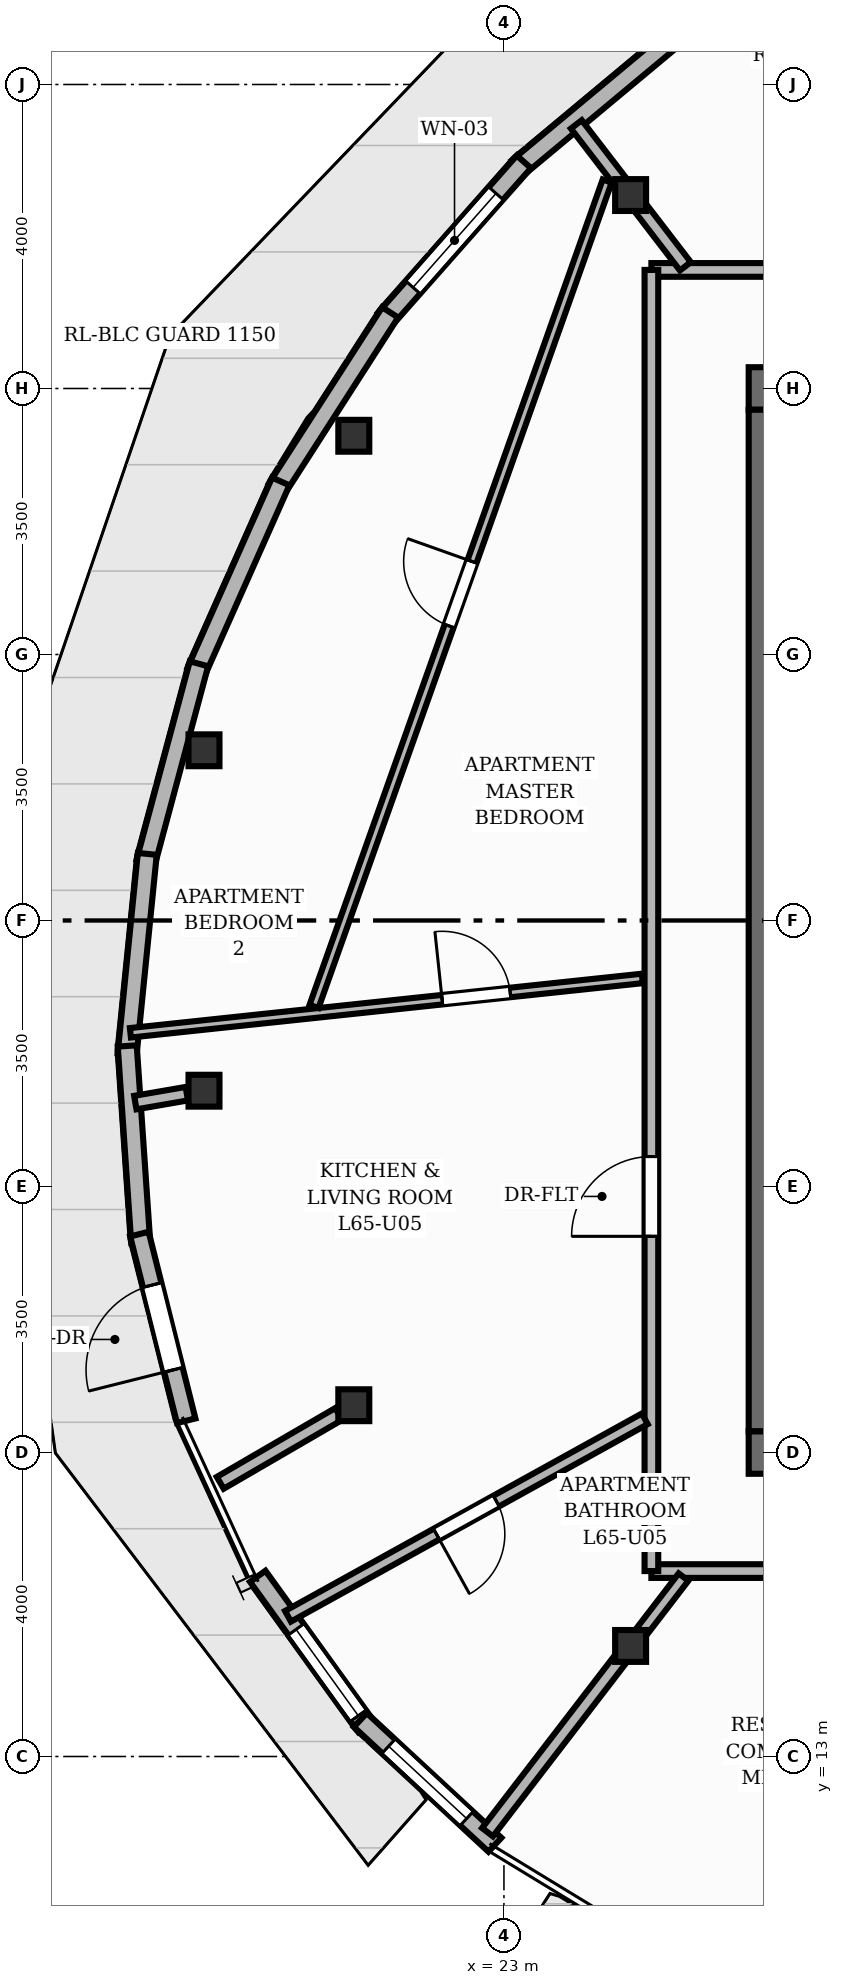
"""IFC4 building model, lengths in metres.
Left out: names, types, materials, properties, quantities, classifications, styles, units other than length and angle.
Written with IfcOpenShell. Run it as: python <this file> out.ifc"""

import sys

from ifc_helpers import new_model, si_unit, direction, frame, frame_2d, origin, origin_2d, place, context, subcontext, project, spatial, rectangle, i_section, extrude, element, fill, save


model = new_model("IFC4")
c1 = context("Model", 3, precision=1e-05, world=origin(), true_north=direction((0.0, 1.0)))
c2 = subcontext(c1, "Body", "Model", "MODEL_VIEW")
j1 = project(units=[si_unit("LENGTHUNIT", "METRE"), si_unit("PLANEANGLEUNIT", "RADIAN")], contexts=[c1])
p1 = place(None, origin())
s1 = spatial("IfcSite", under=j1, at=p1, CompositionType="ELEMENT")
p2 = place(p1, origin())
s2 = spatial("IfcBuilding", under=s1, at=p2, CompositionType="ELEMENT")
p3 = place(p2, frame((0.0, 0.0, 217.44)))
s3 = spatial("IfcBuildingStorey", under=s2, at=p3, CompositionType="ELEMENT", Elevation=217.44)
p4 = place(p3, frame((26.22, 17.0, 0.0), z_axis=(0.0, 0.0, 1.0), x_axis=(1.0, 0.0, 0.0)))
e1 = element("IfcWall", 1, at=p4, inside=s3, PredefinedType="SHEAR", context=c2, shape_type="SweptSolid", body=[
    extrude(rectangle(XDim=11.56, YDim=0.56, at=frame_2d((5.78, 0.0))), origin(), (0.0, 0.0, 1.0), 3.2),
])
p5 = place(p4, frame((2.28, 0.0, 0.0)))
e2 = element("IfcOpeningElement", 2, at=p5, cuts=e1, PredefinedType="OPENING", context=c2, shape_type="SweptSolid", body=[
    extrude(rectangle(XDim=1.1, YDim=2.15, at=frame_2d((0.55, 1.075))), frame((0.0, 0.29, 0.0), z_axis=(0.0, -1.0, 0.0), x_axis=(1.0, 0.0, 0.0)), (0.0, 0.0, 1.0), 0.58),
])
p6 = place(p4, frame((5.83, 0.0, 0.0)))
e3 = element("IfcOpeningElement", 3, at=p6, cuts=e1, PredefinedType="OPENING", context=c2, shape_type="SweptSolid", body=[
    extrude(rectangle(XDim=0.9, YDim=2.1, at=frame_2d((0.45, 1.05))), frame((0.0, 0.29, 0.0), z_axis=(0.0, -1.0, 0.0), x_axis=(1.0, 0.0, 0.0)), (0.0, 0.0, 1.0), 0.58),
])
p7 = place(p3, frame((26.22, 31.0, 0.0), z_axis=(0.0, 0.0, 1.0), x_axis=(1.0, 0.0, 0.0)))
e4 = element("IfcWall", 4, at=p7, inside=s3, PredefinedType="SHEAR", context=c2, shape_type="SweptSolid", body=[
    extrude(rectangle(XDim=11.56, YDim=0.56, at=frame_2d((5.78, 0.0))), origin(), (0.0, 0.0, 1.0), 3.2),
])
p8 = place(p7, frame((8.18, 0.0, 0.0)))
e5 = element("IfcOpeningElement", 5, at=p8, cuts=e4, PredefinedType="OPENING", context=c2, shape_type="SweptSolid", body=[
    extrude(rectangle(XDim=1.1, YDim=2.15, at=frame_2d((0.55, 1.075))), frame((0.0, 0.29, 0.0), z_axis=(0.0, -1.0, 0.0), x_axis=(1.0, 0.0, 0.0)), (0.0, 0.0, 1.0), 0.58),
])
p9 = place(p7, frame((0.805, 0.0, 0.0)))
e6 = element("IfcOpeningElement", 6, at=p9, cuts=e4, PredefinedType="OPENING", context=c2, shape_type="SweptSolid", body=[
    extrude(rectangle(XDim=1.05, YDim=2.15, at=frame_2d((0.525, 1.075))), frame((0.0, 0.29, 0.0), z_axis=(0.0, -1.0, 0.0), x_axis=(1.0, 0.0, 0.0)), (0.0, 0.0, 1.0), 0.58),
])
p10 = place(p7, frame((2.555, 0.0, 0.0)))
e7 = element("IfcOpeningElement", 7, at=p10, cuts=e4, PredefinedType="OPENING", context=c2, shape_type="SweptSolid", body=[
    extrude(rectangle(XDim=1.05, YDim=2.15, at=frame_2d((0.525, 1.075))), frame((0.0, 0.29, 0.0), z_axis=(0.0, -1.0, 0.0), x_axis=(1.0, 0.0, 0.0)), (0.0, 0.0, 1.0), 0.58),
])
p11 = place(p7, frame((4.305, 0.0, 0.0)))
e8 = element("IfcOpeningElement", 8, at=p11, cuts=e4, PredefinedType="OPENING", context=c2, shape_type="SweptSolid", body=[
    extrude(rectangle(XDim=1.05, YDim=2.15, at=frame_2d((0.525, 1.075))), frame((0.0, 0.29, 0.0), z_axis=(0.0, -1.0, 0.0), x_axis=(1.0, 0.0, 0.0)), (0.0, 0.0, 1.0), 0.58),
])
p12 = place(p3, frame((26.5, 17.28, 0.0), z_axis=(0.0, 0.0, 1.0), x_axis=(0.0, 1.0, 0.0)))
e9 = element("IfcWall", 9, at=p12, inside=s3, PredefinedType="SHEAR", context=c2, shape_type="SweptSolid", body=[
    extrude(rectangle(XDim=13.44, YDim=0.56, at=frame_2d((6.72, 0.0))), origin(), (0.0, 0.0, 1.0), 3.2),
])
for number, where, z_axis, x_axis in (
    (10, (24.667, 33.545, 0.0), (0.0, 0.0, 1.0), (1.0, 0.0, 0.0)),
    (11, (21.025, 30.378, 0.0), (0.0, 0.0, 1.0), (1.0, 0.0, 0.0)),
    (12, (19.054, 26.24, 0.0), (0.0, 0.0, 1.0), (1.0, 0.0, 0.0)),
    (13, (19.054, 21.76, 0.0), (0.0, 0.0, 1.0), (1.0, 0.0, 0.0)),
    (14, (21.025, 17.622, 0.0), (0.0, 0.0, 1.0), (1.0, 0.0, 0.0)),
    (15, (24.667, 14.455, 0.0), (0.0, 0.0, 1.0), (1.0, 0.0, 0.0)),
):
    element("IfcColumn", number, at=place(p3, frame(where, z_axis=z_axis, x_axis=x_axis)), inside=s3, PredefinedType="COLUMN", context=c2, shape_type="SweptSolid", body=[
        extrude(i_section(OverallWidth=0.407, OverallDepth=0.419, WebThickness=0.031, FlangeThickness=0.049, at=origin_2d()), origin(), (0.0, 0.0, 1.0), 3.2),
    ])
p13 = place(p3, frame((23.184, 33.906, 0.0), z_axis=(0.0, 0.0, 1.0), x_axis=(0.76821397209, 0.640193168571, 0.0)))
e16 = element("IfcWall", 16, at=p13, inside=s3, PredefinedType="SOLIDWALL", context=c2, shape_type="SweptSolid", body=[
    extrude(rectangle(XDim=2.739, YDim=0.25, at=frame_2d((1.369, 0.0))), origin(), (0.0, 0.0, 1.0), 2.96),
])
p14 = place(p3, frame((21.437, 31.915, 0.0), z_axis=(0.0, 0.0, 1.0), x_axis=(0.661694827408, 0.749773269317, 0.0)))
e17 = element("IfcWall", 17, at=p14, inside=s3, PredefinedType="SOLIDWALL", context=c2, shape_type="SweptSolid", body=[
    extrude(rectangle(XDim=2.758, YDim=0.25, at=frame_2d((1.379, 0.0))), origin(), (0.0, 0.0, 1.0), 2.96),
])
p15 = place(p14, frame((0.554, 0.0, 0.85)))
e18 = element("IfcOpeningElement", 18, at=p15, cuts=e17, PredefinedType="OPENING", context=c2, shape_type="SweptSolid", body=[
    extrude(rectangle(XDim=1.65, YDim=1.55, at=frame_2d((0.825, 0.775))), frame((0.0, 0.135, 0.0), z_axis=(0.0, -1.0, 0.0), x_axis=(1.0, 0.0, 0.0)), (0.0, 0.0, 1.0), 0.27),
])
p16 = place(p3, frame((20.012, 29.681, 0.0), z_axis=(0.0, 0.0, 1.0), x_axis=(0.540690479286, 0.841221615039, 0.0)))
e19 = element("IfcWall", 19, at=p16, inside=s3, PredefinedType="SOLIDWALL", context=c2, shape_type="SweptSolid", body=[
    extrude(rectangle(XDim=2.758, YDim=0.25, at=frame_2d((1.379, 0.0))), origin(), (0.0, 0.0, 1.0), 2.96),
])
p17 = place(p3, frame((18.951, 27.274, 0.0), z_axis=(0.0, 0.0, 1.0), x_axis=(0.40624599189, 0.913763751783, 0.0)))
e20 = element("IfcWall", 20, at=p17, inside=s3, PredefinedType="SOLIDWALL", context=c2, shape_type="SweptSolid", body=[
    extrude(rectangle(XDim=2.739, YDim=0.25, at=frame_2d((1.369, 0.0))), origin(), (0.0, 0.0, 1.0), 2.96),
])
p18 = place(p3, frame((18.288, 24.768, 0.0), z_axis=(0.0, 0.0, 1.0), x_axis=(0.259023691836, 0.965870968126, 0.0)))
e21 = element("IfcWall", 21, at=p18, inside=s3, PredefinedType="SOLIDWALL", context=c2, shape_type="SweptSolid", body=[
    extrude(rectangle(XDim=2.701, YDim=0.25, at=frame_2d((1.351, 0.0))), origin(), (0.0, 0.0, 1.0), 2.577),
])
p19 = place(p3, frame((18.042, 22.239, 0.0), z_axis=(0.0, 0.0, 1.0), x_axis=(0.100196668354, 0.99496765156, 0.0)))
e22 = element("IfcWall", 22, at=p19, inside=s3, PredefinedType="SOLIDWALL", context=c2, shape_type="SweptSolid", body=[
    extrude(rectangle(XDim=2.651, YDim=0.25, at=frame_2d((1.326, 0.0))), origin(), (0.0, 0.0, 1.0), 2.96),
])
p20 = place(p3, frame((18.221, 19.763, 0.0), z_axis=(0.0, 0.0, 1.0), x_axis=(-0.068469168344, 0.997653232835, 0.0)))
e23 = element("IfcWall", 23, at=p20, inside=s3, PredefinedType="SOLIDWALL", context=c2, shape_type="SweptSolid", body=[
    extrude(rectangle(XDim=2.592, YDim=0.25, at=frame_2d((1.296, 0.0))), origin(), (0.0, 0.0, 1.0), 2.96),
])
p21 = place(p3, frame((18.82, 17.417, 0.0), z_axis=(0.0, 0.0, 1.0), x_axis=(-0.243170809566, 0.969983483042, 0.0)))
e24 = element("IfcWall", 24, at=p21, inside=s3, PredefinedType="SOLIDWALL", context=c2, shape_type="SweptSolid", body=[
    extrude(rectangle(XDim=2.532, YDim=0.25, at=frame_2d((1.266, 0.0))), origin(), (0.0, 0.0, 1.0), 2.96),
])
p22 = place(p21, frame((0.691, 0.0, 0.0)))
e25 = element("IfcOpeningElement", 25, at=p22, cuts=e24, PredefinedType="OPENING", context=c2, shape_type="SweptSolid", body=[
    extrude(rectangle(XDim=1.15, YDim=2.2, at=frame_2d((0.575, 1.1))), frame((0.0, 0.135, 0.0), z_axis=(0.0, -1.0, 0.0), x_axis=(1.0, 0.0, 0.0)), (0.0, 0.0, 1.0), 0.27),
])
p23 = place(p3, frame((21.186, 13.395, 0.0), z_axis=(0.0, 0.0, 1.0), x_axis=(-0.584824573101, 0.811159798497, 0.0)))
e26 = element("IfcWall", 26, at=p23, inside=s3, PredefinedType="SOLIDWALL", context=c2, shape_type="SweptSolid", body=[
    extrude(rectangle(XDim=2.437, YDim=0.25, at=frame_2d((1.218, 0.0))), origin(), (0.0, 0.0, 1.0), 2.96),
])
p24 = place(p23, frame((0.175, 0.0, 0.85)))
e27 = element("IfcOpeningElement", 27, at=p24, cuts=e26, PredefinedType="OPENING", context=c2, shape_type="SweptSolid", body=[
    extrude(rectangle(XDim=1.4, YDim=1.55, at=frame_2d((0.7, 0.775))), frame((0.0, 0.135, 0.0), z_axis=(0.0, -1.0, 0.0), x_axis=(1.0, 0.0, 0.0)), (0.0, 0.0, 1.0), 0.27),
])
p25 = place(p3, frame((22.881, 11.839, 0.0), z_axis=(0.0, 0.0, 1.0), x_axis=(-0.733441361842, 0.679752726173, 0.0)))
e28 = element("IfcWall", 28, at=p25, inside=s3, PredefinedType="SOLIDWALL", context=c2, shape_type="SweptSolid", body=[
    extrude(rectangle(XDim=2.415, YDim=0.25, at=frame_2d((1.207, 0.0))), origin(), (0.0, 0.0, 1.0), 2.96),
])
p26 = place(p25, frame((0.507, 0.0, 0.85)))
e29 = element("IfcOpeningElement", 29, at=p26, cuts=e28, PredefinedType="OPENING", context=c2, shape_type="SweptSolid", body=[
    extrude(rectangle(XDim=1.4, YDim=1.55, at=frame_2d((0.7, 0.775))), frame((0.0, 0.135, 0.0), z_axis=(0.0, -1.0, 0.0), x_axis=(1.0, 0.0, 0.0)), (0.0, 0.0, 1.0), 0.27),
])
p27 = place(p3, frame((24.527, 33.727, 0.0), z_axis=(0.0, 0.0, 1.0), x_axis=(-0.60903478373, 0.793143512995, 0.0)))
e30 = element("IfcWall", 30, at=p27, inside=s3, PredefinedType="PARTITIONING", context=c2, shape_type="SweptSolid", body=[
    extrude(rectangle(XDim=0.943, YDim=0.18, at=frame_2d((0.471, 0.0))), origin(), (0.0, 0.0, 1.0), 2.404),
])
p28 = place(p3, frame((18.827, 21.721, 0.0), z_axis=(0.0, 0.0, 1.0), x_axis=(-0.985357392461, -0.170501639647, 0.0)))
e31 = element("IfcWall", 31, at=p28, inside=s3, PredefinedType="PARTITIONING", context=c2, shape_type="SweptSolid", body=[
    extrude(rectangle(XDim=0.687, YDim=0.18, at=frame_2d((0.344, 0.0))), origin(), (0.0, 0.0, 1.0), 2.404),
])
p29 = place(p3, frame((20.826, 17.507, 0.0), z_axis=(0.0, 0.0, 1.0), x_axis=(-0.864637155841, -0.502396843879, 0.0)))
e32 = element("IfcWall", 32, at=p29, inside=s3, PredefinedType="PARTITIONING", context=c2, shape_type="SweptSolid", body=[
    extrude(rectangle(XDim=1.803, YDim=0.18, at=frame_2d((0.901, 0.0))), origin(), (0.0, 0.0, 1.0), 2.404),
])
p30 = place(p3, frame((24.527, 14.273, 0.0), z_axis=(0.0, 0.0, 1.0), x_axis=(-0.609244614772, -0.792982344931, 0.0)))
e33 = element("IfcWall", 33, at=p30, inside=s3, PredefinedType="PARTITIONING", context=c2, shape_type="SweptSolid", body=[
    extrude(rectangle(XDim=2.861, YDim=0.18, at=frame_2d((1.43, 0.0))), origin(), (0.0, 0.0, 1.0), 2.404),
])
p31 = place(p3, frame((30.74, 15.44, 0.0), z_axis=(0.0, 0.0, 1.0), x_axis=(-1.0, 0.0, 0.0)))
e34 = element("IfcWall", 34, at=p31, inside=s3, PredefinedType="PARTITIONING", context=c2, shape_type="SweptSolid", body=[
    extrude(rectangle(XDim=5.8, YDim=0.18, at=frame_2d((2.9, 0.0))), origin(), (0.0, 0.0, 1.0), 2.955),
])
p32 = place(p31, frame((2.221, 0.0, 0.0)))
e35 = element("IfcOpeningElement", 35, at=p32, cuts=e34, PredefinedType="OPENING", context=c2, shape_type="SweptSolid", body=[
    extrude(rectangle(XDim=0.9, YDim=2.1, at=frame_2d((0.45, 1.05))), frame((0.0, 0.1, 0.0), z_axis=(0.0, -1.0, 0.0), x_axis=(1.0, 0.0, 0.0)), (0.0, 0.0, 1.0), 0.2),
])
p33 = place(p3, frame((24.94, 32.56, 0.0), z_axis=(0.0, 0.0, 1.0), x_axis=(1.0, 0.0, 0.0)))
e36 = element("IfcWall", 36, at=p33, inside=s3, PredefinedType="PARTITIONING", context=c2, shape_type="SweptSolid", body=[
    extrude(rectangle(XDim=5.86, YDim=0.18, at=frame_2d((2.93, 0.0))), origin(), (0.0, 0.0, 1.0), 2.955),
])
p34 = place(p33, frame((1.975, 0.0, 0.0)))
e37 = element("IfcOpeningElement", 37, at=p34, cuts=e36, PredefinedType="OPENING", context=c2, shape_type="SweptSolid", body=[
    extrude(rectangle(XDim=0.9, YDim=2.1, at=frame_2d((0.45, 1.05))), frame((0.0, 0.1, 0.0), z_axis=(0.0, -1.0, 0.0), x_axis=(1.0, 0.0, 0.0)), (0.0, 0.0, 1.0), 0.2),
])
p35 = place(p3, frame((24.94, 15.44, 0.0), z_axis=(0.0, 0.0, 1.0), x_axis=(0.0, 1.0, 0.0)))
e38 = element("IfcWall", 38, at=p35, inside=s3, PredefinedType="PARTITIONING", context=c2, shape_type="SweptSolid", body=[
    extrude(rectangle(XDim=17.12, YDim=0.18, at=frame_2d((8.56, 0.0))), origin(), (0.0, 0.0, 1.0), 2.955),
])
p36 = place(p35, frame((4.404, 0.0, 0.0)))
e39 = element("IfcOpeningElement", 39, at=p36, cuts=e38, PredefinedType="OPENING", context=c2, shape_type="SweptSolid", body=[
    extrude(rectangle(XDim=1.05, YDim=2.15, at=frame_2d((0.525, 1.075))), frame((0.0, 0.1, 0.0), z_axis=(0.0, -1.0, 0.0), x_axis=(1.0, 0.0, 0.0)), (0.0, 0.0, 1.0), 0.2),
])
p37 = place(p3, frame((24.806, 14.636, 0.0), z_axis=(0.0, 0.0, 1.0), x_axis=(0.609284308489, 0.792951846854, 0.0)))
e40 = element("IfcWall", 40, at=p37, inside=s3, PredefinedType="PLUMBINGWALL", context=c2, shape_type="SweptSolid", body=[
    extrude(rectangle(XDim=0.913, YDim=0.16, at=frame_2d((0.457, 0.0))), origin(), (0.0, 0.0, 1.0), 2.404),
])
p38 = place(p3, frame((25.387, 32.608, 0.0), z_axis=(0.0, 0.0, 1.0), x_axis=(-0.609302225724, 0.792938079378, 0.0)))
e41 = element("IfcWall", 41, at=p38, inside=s3, PredefinedType="PARTITIONING", context=c2, shape_type="SweptSolid", body=[
    extrude(rectangle(XDim=0.953, YDim=0.18, at=frame_2d((0.477, 0.0))), origin(), (0.0, 0.0, 1.0), 2.404),
])
p39 = place(p3, frame((24.853, 17.443, 0.0), z_axis=(0.0, 0.0, 1.0), x_axis=(-0.874969642777, -0.484177781624, 0.0)))
e42 = element("IfcWall", 42, at=p39, inside=s3, PredefinedType="PLUMBINGWALL", context=c2, shape_type="SweptSolid", body=[
    extrude(rectangle(XDim=5.365, YDim=0.16, at=frame_2d((2.682, 0.0))), origin(), (0.0, 0.0, 1.0), 2.955),
])
p40 = place(p39, frame((2.232, 0.0, 0.0)))
e43 = element("IfcOpeningElement", 43, at=p40, cuts=e42, PredefinedType="OPENING", context=c2, shape_type="SweptSolid", body=[
    extrude(rectangle(XDim=0.9, YDim=2.1, at=frame_2d((0.45, 1.05))), frame((0.0, 0.09, 0.0), z_axis=(0.0, -1.0, 0.0), x_axis=(1.0, 0.0, 0.0)), (0.0, 0.0, 1.0), 0.18),
])
p41 = place(p3, frame((18.086, 22.522, 0.0), z_axis=(0.0, 0.0, 1.0), x_axis=(0.994410835851, 0.105579778091, 0.0)))
e44 = element("IfcWall", 44, at=p41, inside=s3, PredefinedType="PARTITIONING", context=c2, shape_type="SweptSolid", body=[
    extrude(rectangle(XDim=6.773, YDim=0.125, at=frame_2d((3.386, 0.0))), origin(), (0.0, 0.0, 1.0), 2.955),
])
p42 = place(p41, frame((4.124, 0.0, 0.0)))
e45 = element("IfcOpeningElement", 45, at=p42, cuts=e44, PredefinedType="OPENING", context=c2, shape_type="SweptSolid", body=[
    extrude(rectangle(XDim=0.9, YDim=2.1, at=frame_2d((0.45, 1.05))), frame((0.0, 0.073, 0.0), z_axis=(0.0, -1.0, 0.0), x_axis=(1.0, 0.0, 0.0)), (0.0, 0.0, 1.0), 0.145),
])
p43 = place(p3, frame((20.501, 22.87, 0.0), z_axis=(0.0, 0.0, 1.0), x_axis=(0.334686593727, 0.942329498625, 0.0)))
e46 = element("IfcWall", 46, at=p43, inside=s3, PredefinedType="PARTITIONING", context=c2, shape_type="SweptSolid", body=[
    extrude(rectangle(XDim=11.525, YDim=0.125, at=frame_2d((5.762, 0.0))), origin(), (0.0, 0.0, 1.0), 2.488),
])
p44 = place(p43, frame((5.312, 0.0, 0.0)))
e47 = element("IfcOpeningElement", 47, at=p44, cuts=e46, PredefinedType="OPENING", context=c2, shape_type="SweptSolid", body=[
    extrude(rectangle(XDim=0.9, YDim=2.1, at=frame_2d((0.45, 1.05))), frame((0.0, 0.073, 0.0), z_axis=(0.0, -1.0, 0.0), x_axis=(1.0, 0.0, 0.0)), (0.0, 0.0, 1.0), 0.145),
])
p45 = place(p22, origin())
e48 = element("IfcDoor", 48, at=p45, inside=s3, OperationType="SINGLE_SWING_LEFT", PredefinedType="DOOR", context=c2, shape_type="SweptSolid", body=[
    extrude(rectangle(XDim=1.15, YDim=2.2, at=frame_2d((0.575, 1.1))), frame((0.0, 0.025, 0.0), z_axis=(0.0, -1.0, 0.0), x_axis=(1.0, 0.0, 0.0)), (0.0, 0.0, 1.0), 0.05),
])
fill(e25, e48)
p46 = place(p15, origin())
e49 = element("IfcWindow", 49, at=p46, inside=s3, PartitioningType="SINGLE_PANEL", PredefinedType="WINDOW", context=c2, shape_type="SweptSolid", body=[
    extrude(rectangle(XDim=1.65, YDim=1.55, at=frame_2d((0.825, 0.775))), frame((0.0, 0.03, 0.0), z_axis=(0.0, -1.0, 0.0), x_axis=(1.0, 0.0, 0.0)), (0.0, 0.0, 1.0), 0.06),
])
fill(e18, e49)
p47 = place(p24, origin())
e50 = element("IfcWindow", 50, at=p47, inside=s3, PartitioningType="SINGLE_PANEL", PredefinedType="WINDOW", context=c2, shape_type="SweptSolid", body=[
    extrude(rectangle(XDim=1.4, YDim=1.55, at=frame_2d((0.7, 0.775))), frame((0.0, 0.03, 0.0), z_axis=(0.0, -1.0, 0.0), x_axis=(1.0, 0.0, 0.0)), (0.0, 0.0, 1.0), 0.06),
])
fill(e27, e50)
p48 = place(p26, origin())
e51 = element("IfcWindow", 51, at=p48, inside=s3, PartitioningType="SINGLE_PANEL", PredefinedType="WINDOW", context=c2, shape_type="SweptSolid", body=[
    extrude(rectangle(XDim=1.4, YDim=1.55, at=frame_2d((0.7, 0.775))), frame((0.0, 0.03, 0.0), z_axis=(0.0, -1.0, 0.0), x_axis=(1.0, 0.0, 0.0)), (0.0, 0.0, 1.0), 0.06),
])
fill(e29, e51)
p49 = place(p36, origin())
e52 = element("IfcDoor", 52, at=p49, inside=s3, OperationType="SINGLE_SWING_LEFT", PredefinedType="DOOR", context=c2, shape_type="SweptSolid", body=[
    extrude(rectangle(XDim=1.05, YDim=2.15, at=frame_2d((0.525, 1.075))), frame((0.0, 0.025, 0.0), z_axis=(0.0, -1.0, 0.0), x_axis=(1.0, 0.0, 0.0)), (0.0, 0.0, 1.0), 0.05),
])
fill(e39, e52)
p50 = place(p40, origin())
e53 = element("IfcDoor", 53, at=p50, inside=s3, OperationType="SINGLE_SWING_RIGHT", PredefinedType="DOOR", context=c2, shape_type="SweptSolid", body=[
    extrude(rectangle(XDim=0.9, YDim=2.1, at=frame_2d((0.45, 1.05))), frame((0.0, 0.025, 0.0), z_axis=(0.0, -1.0, 0.0), x_axis=(1.0, 0.0, 0.0)), (0.0, 0.0, 1.0), 0.05),
])
fill(e43, e53)
p51 = place(p42, origin())
e54 = element("IfcDoor", 54, at=p51, inside=s3, OperationType="SINGLE_SWING_LEFT", PredefinedType="DOOR", context=c2, shape_type="SweptSolid", body=[
    extrude(rectangle(XDim=0.9, YDim=2.1, at=frame_2d((0.45, 1.05))), frame((0.0, 0.025, 0.0), z_axis=(0.0, -1.0, 0.0), x_axis=(1.0, 0.0, 0.0)), (0.0, 0.0, 1.0), 0.05),
])
fill(e45, e54)
p52 = place(p44, origin())
e55 = element("IfcDoor", 55, at=p52, inside=s3, OperationType="SINGLE_SWING_RIGHT", PredefinedType="DOOR", context=c2, shape_type="SweptSolid", body=[
    extrude(rectangle(XDim=0.9, YDim=2.1, at=frame_2d((0.45, 1.05))), frame((0.0, 0.025, 0.0), z_axis=(0.0, -1.0, 0.0), x_axis=(1.0, 0.0, 0.0)), (0.0, 0.0, 1.0), 0.05),
])
fill(e47, e55)
save(model, sys.argv[1])
